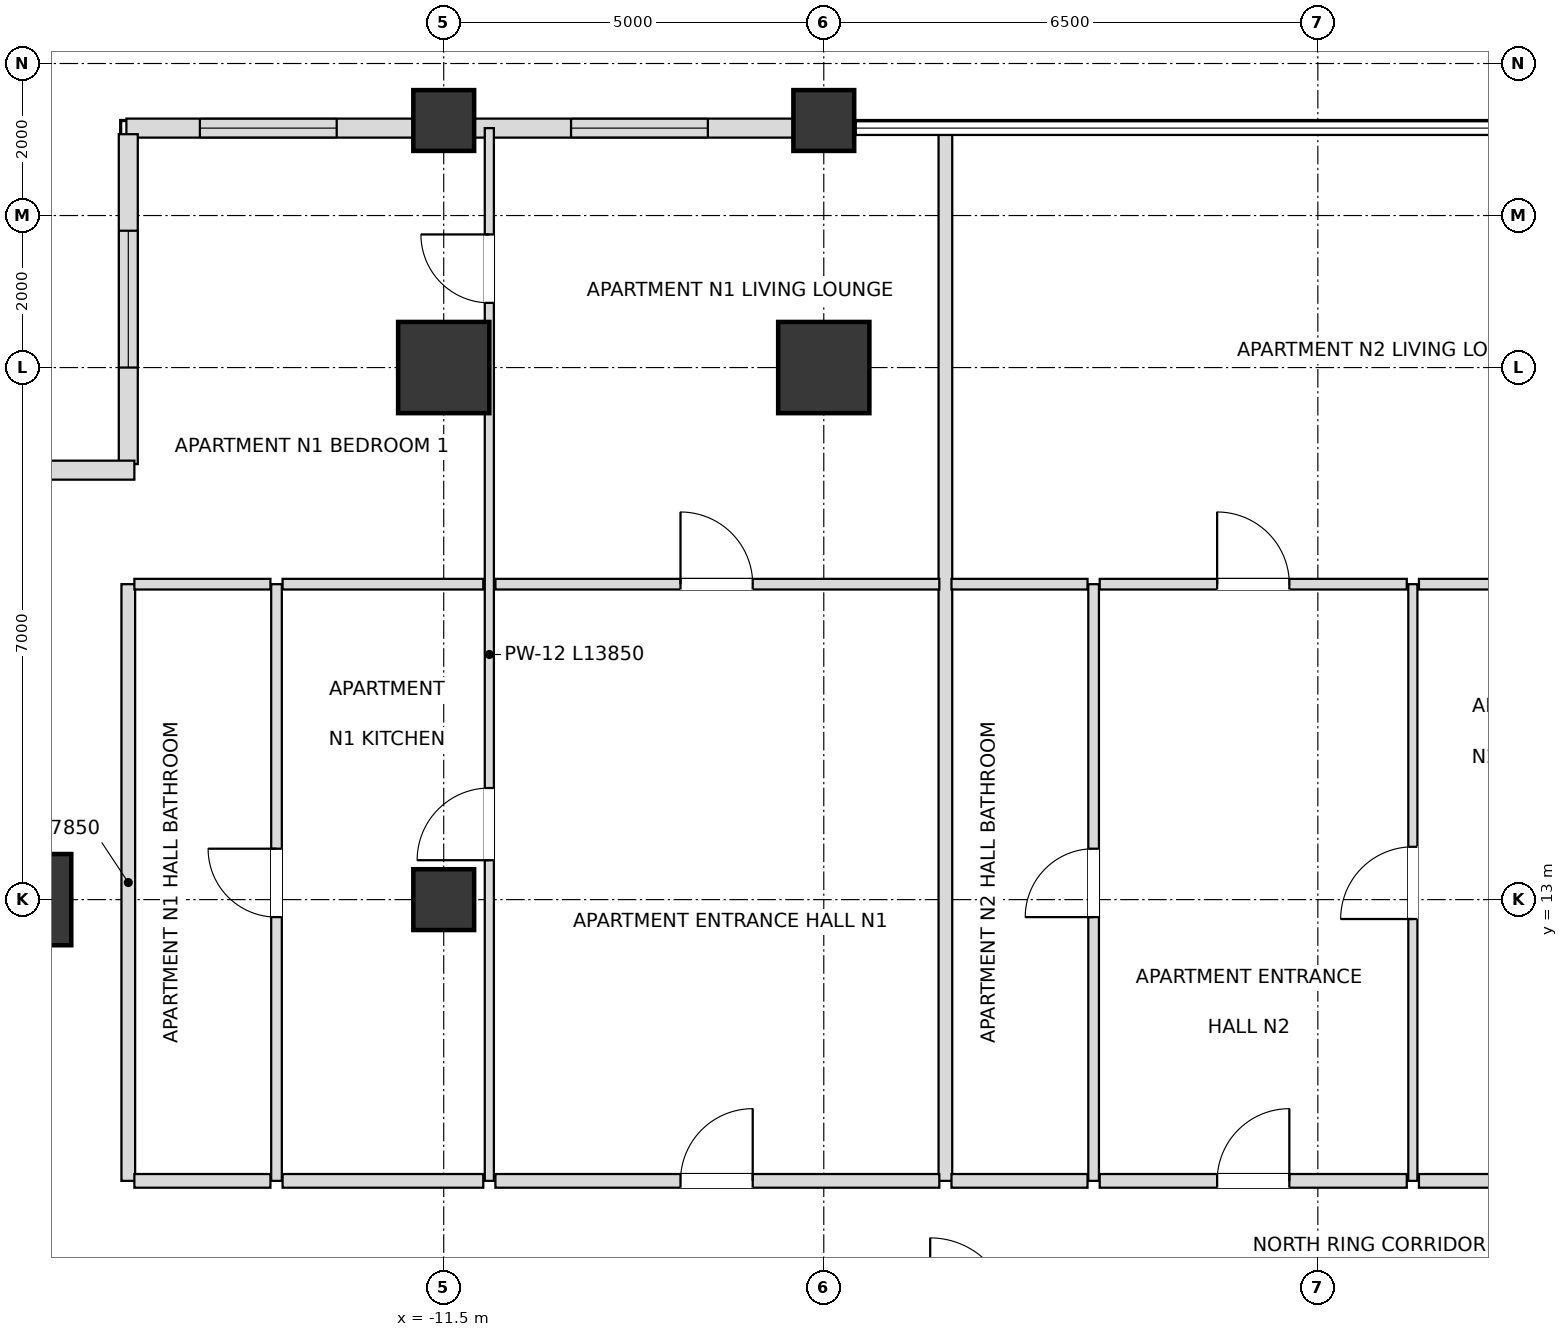
"""IFC4 building model, lengths in metres.
Left out: names, types, materials, properties, quantities, classifications, styles, units other than length and angle.
Written with IfcOpenShell. Run it as: python <this file> out.ifc"""

import sys

from ifc_helpers import new_model, si_unit, direction, frame, frame_2d, origin, origin_2d, place, context, subcontext, project, spatial, rectangle, extrude, element, fill, save


model = new_model("IFC4")
c1 = context("Model", 3, precision=1e-05, world=origin(), true_north=direction((0.0, 1.0)))
c2 = subcontext(c1, "Body", "Model", "MODEL_VIEW")
j1 = project(units=[si_unit("LENGTHUNIT", "METRE"), si_unit("PLANEANGLEUNIT", "RADIAN")], contexts=[c1])
p1 = place(None, origin())
s1 = spatial("IfcSite", under=j1, at=p1, CompositionType="ELEMENT")
p2 = place(p1, origin())
s2 = spatial("IfcBuilding", under=s1, at=p2, CompositionType="ELEMENT")
p3 = place(p2, frame((0.0, 0.0, 117.0)))
s3 = spatial("IfcBuildingStorey", under=s2, at=p3, CompositionType="ELEMENT", Elevation=117.0)
for number, where, z_axis, x_axis in (
    (1, (-6.5, 20.0, 0.0), (0.0, 0.0, 1.0), (1.0, 0.0, 0.0)),
    (2, (-11.5, 20.0, 0.0), (0.0, 0.0, 1.0), (1.0, 0.0, 0.0)),
    (3, (-17.0, 13.0, 0.0), (0.0, 0.0, 1.0), (1.0, 0.0, 0.0)),
):
    element("IfcColumn", number, at=place(p3, frame(where, z_axis=z_axis, x_axis=x_axis)), inside=s3, PredefinedType="USERDEFINED", context=c2, shape_type="SweptSolid", body=[
        extrude(rectangle(XDim=1.2, YDim=1.2, at=origin_2d()), origin(), (0.0, 0.0, 1.0), 3.6),
    ])
for number, where, z_axis, x_axis in (
    (4, (-11.5, 13.0, 0.0), (0.0, 0.0, 1.0), (1.0, 0.0, 0.0)),
    (5, (-11.5, 23.25, 0.0), (0.0, 0.0, 1.0), (1.0, 0.0, 0.0)),
    (6, (-6.5, 23.25, 0.0), (0.0, 0.0, 1.0), (1.0, 0.0, 0.0)),
):
    element("IfcColumn", number, at=place(p3, frame(where, z_axis=z_axis, x_axis=x_axis)), inside=s3, PredefinedType="COLUMN", context=c2, shape_type="SweptSolid", body=[
        extrude(rectangle(XDim=0.8, YDim=0.8, at=origin_2d()), origin(), (0.0, 0.0, 1.0), 3.6),
    ])
p4 = place(p3, frame((-6.895, 23.15, 0.0), z_axis=(0.0, 0.0, 1.0), x_axis=(-1.0, 0.0, 0.0)))
e7 = element("IfcWall", 7, at=p4, inside=s3, PredefinedType="SOLIDWALL", context=c2, shape_type="SweptSolid", body=[
    extrude(rectangle(XDim=4.21, YDim=0.25, at=frame_2d((2.105, 0.0))), origin(), (0.0, 0.0, 1.0), 2.656),
])
p5 = place(p4, frame((1.13, 0.0, 0.72)))
e8 = element("IfcOpeningElement", 8, at=p5, cuts=e7, PredefinedType="OPENING", context=c2, shape_type="SweptSolid", body=[
    extrude(rectangle(XDim=1.8, YDim=1.68, at=frame_2d((0.9, 0.84))), frame((0.0, 0.135, 0.0), z_axis=(0.0, -1.0, 0.0), x_axis=(1.0, 0.0, 0.0)), (0.0, 0.0, 1.0), 0.27),
])
p6 = place(p3, frame((-11.895, 23.15, 0.0), z_axis=(0.0, 0.0, 1.0), x_axis=(-1.0, 0.0, 0.0)))
e9 = element("IfcWall", 9, at=p6, inside=s3, PredefinedType="SOLIDWALL", context=c2, shape_type="SweptSolid", body=[
    extrude(rectangle(XDim=3.78, YDim=0.25, at=frame_2d((1.89, 0.0))), origin(), (0.0, 0.0, 1.0), 2.656),
])
p7 = place(p6, frame((1.013, 0.0, 0.72)))
e10 = element("IfcOpeningElement", 10, at=p7, cuts=e9, PredefinedType="OPENING", context=c2, shape_type="SweptSolid", body=[
    extrude(rectangle(XDim=1.8, YDim=1.68, at=frame_2d((0.9, 0.84))), frame((0.0, 0.135, 0.0), z_axis=(0.0, -1.0, 0.0), x_axis=(1.0, 0.0, 0.0)), (0.0, 0.0, 1.0), 0.27),
])
p8 = place(p3, frame((-15.65, 23.07, 0.0), z_axis=(0.0, 0.0, 1.0), x_axis=(0.0, -1.0, 0.0)))
e11 = element("IfcWall", 11, at=p8, inside=s3, PredefinedType="SOLIDWALL", context=c2, shape_type="SweptSolid", body=[
    extrude(rectangle(XDim=4.34, YDim=0.25, at=frame_2d((2.17, 0.0))), origin(), (0.0, 0.0, 1.0), 2.656),
])
p9 = place(p8, frame((1.27, 0.0, 0.72)))
e12 = element("IfcOpeningElement", 12, at=p9, cuts=e11, PredefinedType="OPENING", context=c2, shape_type="SweptSolid", body=[
    extrude(rectangle(XDim=1.8, YDim=1.68, at=frame_2d((0.9, 0.84))), frame((0.0, 0.135, 0.0), z_axis=(0.0, -1.0, 0.0), x_axis=(1.0, 0.0, 0.0)), (0.0, 0.0, 1.0), 0.27),
])
p10 = place(p3, frame((-15.57, 18.65, 0.0), z_axis=(0.0, 0.0, 1.0), x_axis=(-1.0, 0.0, 0.0)))
e13 = element("IfcWall", 13, at=p10, inside=s3, PredefinedType="SOLIDWALL", context=c2, shape_type="SweptSolid", body=[
    extrude(rectangle(XDim=4.66, YDim=0.25, at=frame_2d((2.33, 0.0))), origin(), (0.0, 0.0, 1.0), 2.656),
])
p11 = place(p10, frame((1.43, 0.0, 0.72)))
e14 = element("IfcOpeningElement", 14, at=p11, cuts=e13, PredefinedType="OPENING", context=c2, shape_type="SweptSolid", body=[
    extrude(rectangle(XDim=1.8, YDim=1.68, at=frame_2d((0.9, 0.84))), frame((0.0, 0.135, 0.0), z_axis=(0.0, -1.0, 0.0), x_axis=(1.0, 0.0, 0.0)), (0.0, 0.0, 1.0), 0.27),
])
p12 = place(p3, frame((-15.65, 9.3, 0.0), z_axis=(0.0, 0.0, 1.0), x_axis=(0.0, 1.0, 0.0)))
e15 = element("IfcWall", 15, at=p12, inside=s3, PredefinedType="PARTITIONING", context=c2, shape_type="SweptSolid", body=[
    extrude(rectangle(XDim=7.85, YDim=0.18, at=frame_2d((3.925, 0.0))), origin(), (0.0, 0.0, 1.0), 2.656),
])
p13 = place(p3, frame((-13.7, 9.3, 0.0), z_axis=(0.0, 0.0, 1.0), x_axis=(0.0, 1.0, 0.0)))
e16 = element("IfcWall", 16, at=p13, inside=s3, PredefinedType="PARTITIONING", context=c2, shape_type="SweptSolid", body=[
    extrude(rectangle(XDim=7.85, YDim=0.14, at=frame_2d((3.925, 0.0))), origin(), (0.0, 0.0, 1.0), 2.656),
])
p14 = place(p13, frame((3.47, 0.0, 0.0)))
e17 = element("IfcOpeningElement", 17, at=p14, cuts=e16, PredefinedType="OPENING", context=c2, shape_type="SweptSolid", body=[
    extrude(rectangle(XDim=0.9, YDim=2.1, at=frame_2d((0.45, 1.05))), frame((0.0, 0.08, 0.0), z_axis=(0.0, -1.0, 0.0), x_axis=(1.0, 0.0, 0.0)), (0.0, 0.0, 1.0), 0.16),
])
p15 = place(p3, frame((-10.9, 9.3, 0.0), z_axis=(0.0, 0.0, 1.0), x_axis=(0.0, 1.0, 0.0)))
e18 = element("IfcWall", 18, at=p15, inside=s3, PredefinedType="PARTITIONING", context=c2, shape_type="SweptSolid", body=[
    extrude(rectangle(XDim=13.85, YDim=0.12, at=frame_2d((6.925, 0.0))), origin(), (0.0, 0.0, 1.0), 2.736),
])
p16 = place(p15, frame((4.219, 0.0, 0.0)))
e19 = element("IfcOpeningElement", 19, at=p16, cuts=e18, PredefinedType="OPENING", context=c2, shape_type="SweptSolid", body=[
    extrude(rectangle(XDim=0.95, YDim=2.1, at=frame_2d((0.475, 1.05))), frame((0.0, 0.07, 0.0), z_axis=(0.0, -1.0, 0.0), x_axis=(1.0, 0.0, 0.0)), (0.0, 0.0, 1.0), 0.14),
])
p17 = place(p15, frame((11.551, 0.0, 0.0)))
e20 = element("IfcOpeningElement", 20, at=p17, cuts=e18, PredefinedType="OPENING", context=c2, shape_type="SweptSolid", body=[
    extrude(rectangle(XDim=0.9, YDim=2.1, at=frame_2d((0.45, 1.05))), frame((0.0, 0.07, 0.0), z_axis=(0.0, -1.0, 0.0), x_axis=(1.0, 0.0, 0.0)), (0.0, 0.0, 1.0), 0.14),
])
p18 = place(p3, frame((-4.9, 9.3, 0.0), z_axis=(0.0, 0.0, 1.0), x_axis=(0.0, 1.0, 0.0)))
e21 = element("IfcWall", 21, at=p18, inside=s3, PredefinedType="PARTITIONING", context=c2, shape_type="SweptSolid", body=[
    extrude(rectangle(XDim=13.85, YDim=0.18, at=frame_2d((6.925, 0.0))), origin(), (0.0, 0.0, 1.0), 2.736),
])
p19 = place(p3, frame((-2.95, 9.3, 0.0), z_axis=(0.0, 0.0, 1.0), x_axis=(0.0, 1.0, 0.0)))
e22 = element("IfcWall", 22, at=p19, inside=s3, PredefinedType="PARTITIONING", context=c2, shape_type="SweptSolid", body=[
    extrude(rectangle(XDim=7.85, YDim=0.14, at=frame_2d((3.925, 0.0))), origin(), (0.0, 0.0, 1.0), 3.3),
])
p20 = place(p19, frame((3.47, 0.0, 0.0)))
e23 = element("IfcOpeningElement", 23, at=p20, cuts=e22, PredefinedType="OPENING", context=c2, shape_type="SweptSolid", body=[
    extrude(rectangle(XDim=0.9, YDim=2.1, at=frame_2d((0.45, 1.05))), frame((0.0, 0.08, 0.0), z_axis=(0.0, -1.0, 0.0), x_axis=(1.0, 0.0, 0.0)), (0.0, 0.0, 1.0), 0.16),
])
p21 = place(p3, frame((1.25, 9.3, 0.0), z_axis=(0.0, 0.0, 1.0), x_axis=(0.0, 1.0, 0.0)))
e24 = element("IfcWall", 24, at=p21, inside=s3, PredefinedType="PARTITIONING", context=c2, shape_type="SweptSolid", body=[
    extrude(rectangle(XDim=7.85, YDim=0.12, at=frame_2d((3.925, 0.0))), origin(), (0.0, 0.0, 1.0), 3.3),
])
p22 = place(p21, frame((3.445, 0.0, 0.0)))
e25 = element("IfcOpeningElement", 25, at=p22, cuts=e24, PredefinedType="OPENING", context=c2, shape_type="SweptSolid", body=[
    extrude(rectangle(XDim=0.95, YDim=2.1, at=frame_2d((0.475, 1.05))), frame((0.0, 0.07, 0.0), z_axis=(0.0, -1.0, 0.0), x_axis=(1.0, 0.0, 0.0)), (0.0, 0.0, 1.0), 0.14),
])
p23 = place(p3, frame((-15.57, 9.3, 0.0), z_axis=(0.0, 0.0, 1.0), x_axis=(1.0, 0.0, 0.0)))
e26 = element("IfcWall", 26, at=p23, inside=s3, PredefinedType="PARTITIONING", context=c2, shape_type="SweptSolid", body=[
    extrude(rectangle(XDim=1.79, YDim=0.18, at=frame_2d((0.895, 0.0))), origin(), (0.0, 0.0, 1.0), 3.3),
])
p24 = place(p3, frame((-13.62, 9.3, 0.0), z_axis=(0.0, 0.0, 1.0), x_axis=(1.0, 0.0, 0.0)))
e27 = element("IfcWall", 27, at=p24, inside=s3, PredefinedType="PARTITIONING", context=c2, shape_type="SweptSolid", body=[
    extrude(rectangle(XDim=2.64, YDim=0.18, at=frame_2d((1.32, 0.0))), origin(), (0.0, 0.0, 1.0), 3.3),
])
p25 = place(p3, frame((-10.82, 9.3, 0.0), z_axis=(0.0, 0.0, 1.0), x_axis=(1.0, 0.0, 0.0)))
e28 = element("IfcWall", 28, at=p25, inside=s3, PredefinedType="PARTITIONING", context=c2, shape_type="SweptSolid", body=[
    extrude(rectangle(XDim=5.84, YDim=0.18, at=frame_2d((2.92, 0.0))), origin(), (0.0, 0.0, 1.0), 2.736),
])
p26 = place(p25, frame((2.435, 0.0, 0.0)))
e29 = element("IfcOpeningElement", 29, at=p26, cuts=e28, PredefinedType="OPENING", context=c2, shape_type="SweptSolid", body=[
    extrude(rectangle(XDim=0.95, YDim=2.15, at=frame_2d((0.475, 1.075))), frame((0.0, 0.1, 0.0), z_axis=(0.0, -1.0, 0.0), x_axis=(1.0, 0.0, 0.0)), (0.0, 0.0, 1.0), 0.2),
])
p27 = place(p3, frame((-4.82, 9.3, 0.0), z_axis=(0.0, 0.0, 1.0), x_axis=(1.0, 0.0, 0.0)))
e30 = element("IfcWall", 30, at=p27, inside=s3, PredefinedType="PARTITIONING", context=c2, shape_type="SweptSolid", body=[
    extrude(rectangle(XDim=1.79, YDim=0.18, at=frame_2d((0.895, 0.0))), origin(), (0.0, 0.0, 1.0), 3.3),
])
p28 = place(p3, frame((-2.87, 9.3, 0.0), z_axis=(0.0, 0.0, 1.0), x_axis=(1.0, 0.0, 0.0)))
e31 = element("IfcWall", 31, at=p28, inside=s3, PredefinedType="PARTITIONING", context=c2, shape_type="SweptSolid", body=[
    extrude(rectangle(XDim=4.04, YDim=0.18, at=frame_2d((2.02, 0.0))), origin(), (0.0, 0.0, 1.0), 3.3),
])
p29 = place(p28, frame((1.545, 0.0, 0.0)))
e32 = element("IfcOpeningElement", 32, at=p29, cuts=e31, PredefinedType="OPENING", context=c2, shape_type="SweptSolid", body=[
    extrude(rectangle(XDim=0.95, YDim=2.15, at=frame_2d((0.475, 1.075))), frame((0.0, 0.1, 0.0), z_axis=(0.0, -1.0, 0.0), x_axis=(1.0, 0.0, 0.0)), (0.0, 0.0, 1.0), 0.2),
])
p30 = place(p3, frame((1.33, 9.3, 0.0), z_axis=(0.0, 0.0, 1.0), x_axis=(1.0, 0.0, 0.0)))
e33 = element("IfcWall", 33, at=p30, inside=s3, PredefinedType="PARTITIONING", context=c2, shape_type="SweptSolid", body=[
    extrude(rectangle(XDim=3.04, YDim=0.18, at=frame_2d((1.52, 0.0))), origin(), (0.0, 0.0, 1.0), 3.3),
])
p31 = place(p3, frame((-15.57, 17.15, 0.0), z_axis=(0.0, 0.0, 1.0), x_axis=(1.0, 0.0, 0.0)))
e34 = element("IfcWall", 34, at=p31, inside=s3, PredefinedType="PARTITIONING", context=c2, shape_type="SweptSolid", body=[
    extrude(rectangle(XDim=1.79, YDim=0.14, at=frame_2d((0.895, 0.0))), origin(), (0.0, 0.0, 1.0), 2.656),
])
p32 = place(p3, frame((-13.62, 17.15, 0.0), z_axis=(0.0, 0.0, 1.0), x_axis=(1.0, 0.0, 0.0)))
e35 = element("IfcWall", 35, at=p32, inside=s3, PredefinedType="PARTITIONING", context=c2, shape_type="SweptSolid", body=[
    extrude(rectangle(XDim=2.64, YDim=0.14, at=frame_2d((1.32, 0.0))), origin(), (0.0, 0.0, 1.0), 2.656),
])
p33 = place(p3, frame((-10.82, 17.15, 0.0), z_axis=(0.0, 0.0, 1.0), x_axis=(1.0, 0.0, 0.0)))
e36 = element("IfcWall", 36, at=p33, inside=s3, PredefinedType="PARTITIONING", context=c2, shape_type="SweptSolid", body=[
    extrude(rectangle(XDim=5.84, YDim=0.14, at=frame_2d((2.92, 0.0))), origin(), (0.0, 0.0, 1.0), 2.736),
])
p34 = place(p33, frame((2.435, 0.0, 0.0)))
e37 = element("IfcOpeningElement", 37, at=p34, cuts=e36, PredefinedType="OPENING", context=c2, shape_type="SweptSolid", body=[
    extrude(rectangle(XDim=0.95, YDim=2.1, at=frame_2d((0.475, 1.05))), frame((0.0, 0.08, 0.0), z_axis=(0.0, -1.0, 0.0), x_axis=(1.0, 0.0, 0.0)), (0.0, 0.0, 1.0), 0.16),
])
p35 = place(p3, frame((-4.82, 17.15, 0.0), z_axis=(0.0, 0.0, 1.0), x_axis=(1.0, 0.0, 0.0)))
e38 = element("IfcWall", 38, at=p35, inside=s3, PredefinedType="PARTITIONING", context=c2, shape_type="SweptSolid", body=[
    extrude(rectangle(XDim=1.79, YDim=0.14, at=frame_2d((0.895, 0.0))), origin(), (0.0, 0.0, 1.0), 3.3),
])
p36 = place(p3, frame((-2.87, 17.15, 0.0), z_axis=(0.0, 0.0, 1.0), x_axis=(1.0, 0.0, 0.0)))
e39 = element("IfcWall", 39, at=p36, inside=s3, PredefinedType="PARTITIONING", context=c2, shape_type="SweptSolid", body=[
    extrude(rectangle(XDim=4.04, YDim=0.14, at=frame_2d((2.02, 0.0))), origin(), (0.0, 0.0, 1.0), 3.3),
])
p37 = place(p36, frame((1.545, 0.0, 0.0)))
e40 = element("IfcOpeningElement", 40, at=p37, cuts=e39, PredefinedType="OPENING", context=c2, shape_type="SweptSolid", body=[
    extrude(rectangle(XDim=0.95, YDim=2.1, at=frame_2d((0.475, 1.05))), frame((0.0, 0.08, 0.0), z_axis=(0.0, -1.0, 0.0), x_axis=(1.0, 0.0, 0.0)), (0.0, 0.0, 1.0), 0.16),
])
p38 = place(p3, frame((1.33, 17.15, 0.0), z_axis=(0.0, 0.0, 1.0), x_axis=(1.0, 0.0, 0.0)))
e41 = element("IfcWall", 41, at=p38, inside=s3, PredefinedType="PARTITIONING", context=c2, shape_type="SweptSolid", body=[
    extrude(rectangle(XDim=3.04, YDim=0.14, at=frame_2d((1.52, 0.0))), origin(), (0.0, 0.0, 1.0), 3.3),
])
p39 = place(p5, origin())
e42 = element("IfcWindow", 42, at=p39, inside=s3, PartitioningType="SINGLE_PANEL", PredefinedType="WINDOW", context=c2, shape_type="SweptSolid", body=[
    extrude(rectangle(XDim=1.8, YDim=1.68, at=frame_2d((0.9, 0.84))), frame((0.0, 0.03, 0.0), z_axis=(0.0, -1.0, 0.0), x_axis=(1.0, 0.0, 0.0)), (0.0, 0.0, 1.0), 0.06),
])
fill(e8, e42)
p40 = place(p7, origin())
e43 = element("IfcWindow", 43, at=p40, inside=s3, PartitioningType="SINGLE_PANEL", PredefinedType="WINDOW", context=c2, shape_type="SweptSolid", body=[
    extrude(rectangle(XDim=1.8, YDim=1.68, at=frame_2d((0.9, 0.84))), frame((0.0, 0.03, 0.0), z_axis=(0.0, -1.0, 0.0), x_axis=(1.0, 0.0, 0.0)), (0.0, 0.0, 1.0), 0.06),
])
fill(e10, e43)
p41 = place(p9, origin())
e44 = element("IfcWindow", 44, at=p41, inside=s3, PartitioningType="SINGLE_PANEL", PredefinedType="WINDOW", context=c2, shape_type="SweptSolid", body=[
    extrude(rectangle(XDim=1.8, YDim=1.68, at=frame_2d((0.9, 0.84))), frame((0.0, 0.03, 0.0), z_axis=(0.0, -1.0, 0.0), x_axis=(1.0, 0.0, 0.0)), (0.0, 0.0, 1.0), 0.06),
])
fill(e12, e44)
p42 = place(p26, origin())
e45 = element("IfcDoor", 45, at=p42, inside=s3, OperationType="SINGLE_SWING_RIGHT", PredefinedType="DOOR", context=c2, shape_type="SweptSolid", body=[
    extrude(rectangle(XDim=0.95, YDim=2.15, at=frame_2d((0.475, 1.075))), frame((0.0, 0.025, 0.0), z_axis=(0.0, -1.0, 0.0), x_axis=(1.0, 0.0, 0.0)), (0.0, 0.0, 1.0), 0.05),
])
fill(e29, e45)
p43 = place(p16, origin())
e46 = element("IfcDoor", 46, at=p43, inside=s3, OperationType="SINGLE_SWING_LEFT", PredefinedType="DOOR", context=c2, shape_type="SweptSolid", body=[
    extrude(rectangle(XDim=0.95, YDim=2.1, at=frame_2d((0.475, 1.05))), frame((0.0, 0.025, 0.0), z_axis=(0.0, -1.0, 0.0), x_axis=(1.0, 0.0, 0.0)), (0.0, 0.0, 1.0), 0.05),
])
fill(e19, e46)
p44 = place(p14, origin())
e47 = element("IfcDoor", 47, at=p44, inside=s3, OperationType="SINGLE_SWING_RIGHT", PredefinedType="DOOR", context=c2, shape_type="SweptSolid", body=[
    extrude(rectangle(XDim=0.9, YDim=2.1, at=frame_2d((0.45, 1.05))), frame((0.0, 0.025, 0.0), z_axis=(0.0, -1.0, 0.0), x_axis=(1.0, 0.0, 0.0)), (0.0, 0.0, 1.0), 0.05),
])
fill(e17, e47)
p45 = place(p34, origin())
e48 = element("IfcDoor", 48, at=p45, inside=s3, OperationType="SINGLE_SWING_LEFT", PredefinedType="DOOR", context=c2, shape_type="SweptSolid", body=[
    extrude(rectangle(XDim=0.95, YDim=2.1, at=frame_2d((0.475, 1.05))), frame((0.0, 0.025, 0.0), z_axis=(0.0, -1.0, 0.0), x_axis=(1.0, 0.0, 0.0)), (0.0, 0.0, 1.0), 0.05),
])
fill(e37, e48)
p46 = place(p17, origin())
e49 = element("IfcDoor", 49, at=p46, inside=s3, OperationType="SINGLE_SWING_RIGHT", PredefinedType="DOOR", context=c2, shape_type="SweptSolid", body=[
    extrude(rectangle(XDim=0.9, YDim=2.1, at=frame_2d((0.45, 1.05))), frame((0.0, 0.025, 0.0), z_axis=(0.0, -1.0, 0.0), x_axis=(1.0, 0.0, 0.0)), (0.0, 0.0, 1.0), 0.05),
])
fill(e20, e49)
p47 = place(p20, origin())
e50 = element("IfcDoor", 50, at=p47, inside=s3, OperationType="SINGLE_SWING_LEFT", PredefinedType="DOOR", context=c2, shape_type="SweptSolid", body=[
    extrude(rectangle(XDim=0.9, YDim=2.1, at=frame_2d((0.45, 1.05))), frame((0.0, 0.025, 0.0), z_axis=(0.0, -1.0, 0.0), x_axis=(1.0, 0.0, 0.0)), (0.0, 0.0, 1.0), 0.05),
])
fill(e23, e50)
p48 = place(p29, origin())
e51 = element("IfcDoor", 51, at=p48, inside=s3, OperationType="SINGLE_SWING_RIGHT", PredefinedType="DOOR", context=c2, shape_type="SweptSolid", body=[
    extrude(rectangle(XDim=0.95, YDim=2.15, at=frame_2d((0.475, 1.075))), frame((0.0, 0.025, 0.0), z_axis=(0.0, -1.0, 0.0), x_axis=(1.0, 0.0, 0.0)), (0.0, 0.0, 1.0), 0.05),
])
fill(e32, e51)
p49 = place(p22, origin())
e52 = element("IfcDoor", 52, at=p49, inside=s3, OperationType="SINGLE_SWING_LEFT", PredefinedType="DOOR", context=c2, shape_type="SweptSolid", body=[
    extrude(rectangle(XDim=0.95, YDim=2.1, at=frame_2d((0.475, 1.05))), frame((0.0, 0.025, 0.0), z_axis=(0.0, -1.0, 0.0), x_axis=(1.0, 0.0, 0.0)), (0.0, 0.0, 1.0), 0.05),
])
fill(e25, e52)
p50 = place(p37, origin())
e53 = element("IfcDoor", 53, at=p50, inside=s3, OperationType="SINGLE_SWING_LEFT", PredefinedType="DOOR", context=c2, shape_type="SweptSolid", body=[
    extrude(rectangle(XDim=0.95, YDim=2.1, at=frame_2d((0.475, 1.05))), frame((0.0, 0.025, 0.0), z_axis=(0.0, -1.0, 0.0), x_axis=(1.0, 0.0, 0.0)), (0.0, 0.0, 1.0), 0.05),
])
fill(e40, e53)
save(model, sys.argv[1])
